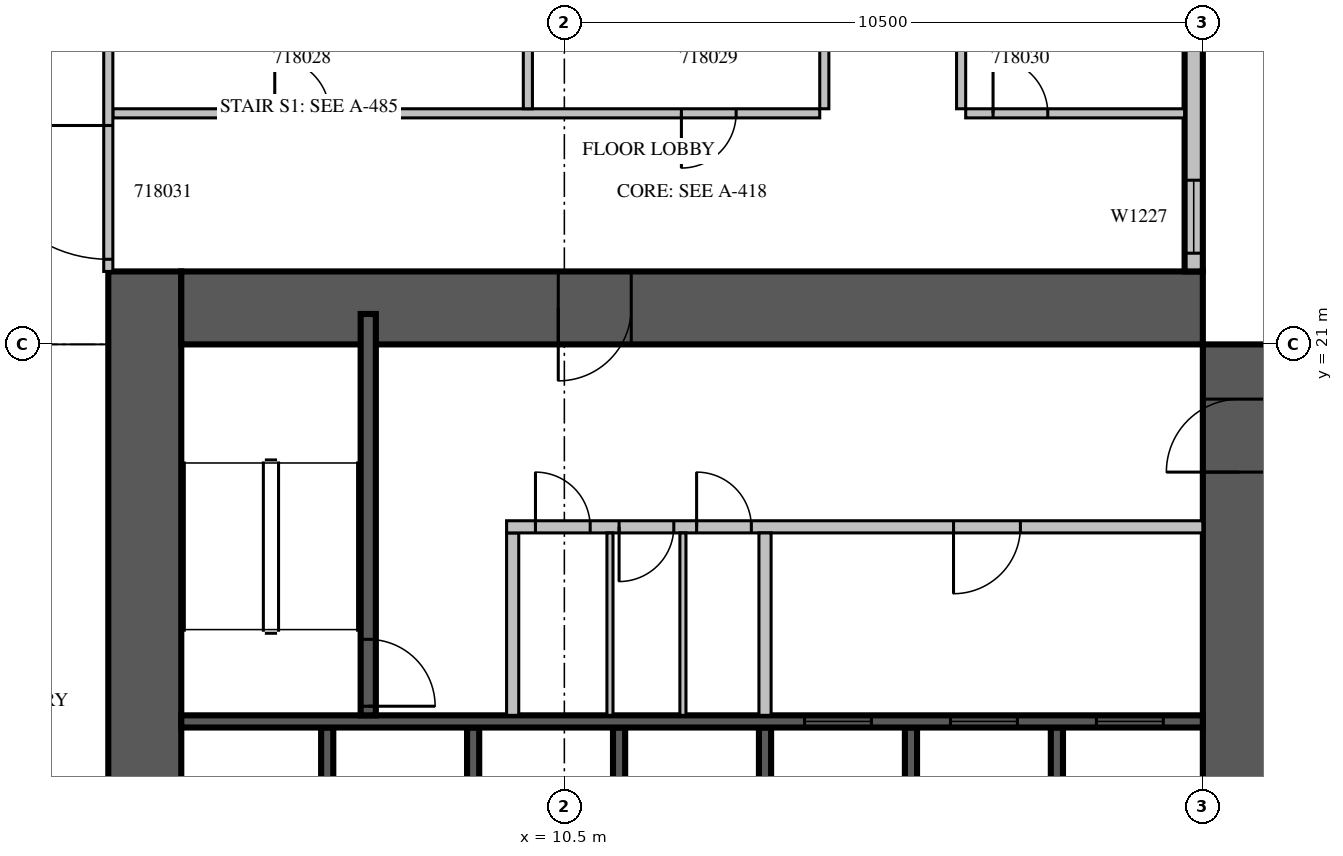
"""IFC4 building model, lengths in metres.
Left out: names, types, materials, properties, quantities, classifications, styles, units other than length and angle.
Written with IfcOpenShell. Run it as: python <this file> out.ifc"""

import sys

from ifc_helpers import new_model, si_unit, direction, frame, frame_2d, origin, place, context, subcontext, project, spatial, rectangle, extrude, source, transform, mapped, element, fill, save


model = new_model("IFC4")
c1 = context("Model", 3, precision=1e-05, world=origin(), true_north=direction((0.0, 1.0)))
c2 = subcontext(c1, "Body", "Model", "MODEL_VIEW")
j1 = project(units=[si_unit("LENGTHUNIT", "METRE"), si_unit("PLANEANGLEUNIT", "RADIAN")], contexts=[c1])
p1 = place(None, origin())
s1 = spatial("IfcSite", under=j1, at=p1, CompositionType="ELEMENT")
p2 = place(p1, origin())
s2 = spatial("IfcBuilding", under=s1, at=p2, CompositionType="ELEMENT")
p3 = place(p2, frame((0.0, 0.0, 86.7)))
s3 = spatial("IfcBuildingStorey", under=s2, at=p3, CompositionType="ELEMENT", Elevation=86.7)
m1 = source(origin(), c2, "Body", "SweptSolid", [
    extrude(rectangle(XDim=18.0, YDim=1.2, at=frame_2d((9.0, 0.0))), origin(), (0.0, 0.0, 1.0), 4.2),
])
p4 = place(p3, frame((3.6, 4.2, 0.0), z_axis=(0.0, 0.0, 1.0), x_axis=(0.0, 1.0, 0.0)))
e1 = element("IfcWall", 1, at=p4, inside=s3, PredefinedType="SHEAR", context=c2, shape_type="MappedRepresentation", body=[
    mapped(m1, transform((0.0, 0.0, 0.0), scale=1.0)),
])
m2 = source(origin(), c2, "Body", "SweptSolid", [
    extrude(rectangle(XDim=2.2, YDim=2.1, at=frame_2d((1.1, 1.05))), frame((0.0, 0.61, 0.0), z_axis=(0.0, -1.0, 0.0), x_axis=(1.0, 0.0, 0.0)), (0.0, 0.0, 1.0), 1.22),
])
p5 = place(p4, frame((4.2, 0.0, 0.0)))
e2 = element("IfcOpeningElement", 2, at=p5, cuts=e1, PredefinedType="OPENING", context=c2, shape_type="MappedRepresentation", body=[
    mapped(m2, transform((0.0, 0.0, 0.0), scale=1.0)),
])
m3 = source(origin(), c2, "Body", "SweptSolid", [
    extrude(rectangle(XDim=16.8, YDim=1.2, at=frame_2d((8.4, 0.0))), origin(), (0.0, 0.0, 1.0), 4.2),
])
p6 = place(p3, frame((21.6, 4.2, 0.0), z_axis=(0.0, 0.0, 1.0), x_axis=(0.0, 1.0, 0.0)))
e3 = element("IfcWall", 3, at=p6, inside=s3, PredefinedType="SHEAR", context=c2, shape_type="MappedRepresentation", body=[
    mapped(m3, transform((0.0, 0.0, 0.0), scale=1.0)),
])
p7 = place(p6, frame((4.2, 0.0, 0.0)))
e4 = element("IfcOpeningElement", 4, at=p7, cuts=e3, PredefinedType="OPENING", context=c2, shape_type="MappedRepresentation", body=[
    mapped(m2, transform((0.0, 0.0, 0.0), scale=1.0)),
])
m4 = source(origin(), c2, "Body", "SweptSolid", [
    extrude(rectangle(XDim=1.2, YDim=2.1, at=frame_2d((0.6, 1.05))), frame((0.0, 0.61, 0.0), z_axis=(0.0, -1.0, 0.0), x_axis=(1.0, 0.0, 0.0)), (0.0, 0.0, 1.0), 1.22),
])
p8 = place(p6, frame((14.7, 0.0, 0.0)))
e5 = element("IfcOpeningElement", 5, at=p8, cuts=e3, PredefinedType="OPENING", context=c2, shape_type="MappedRepresentation", body=[
    mapped(m4, transform((0.0, 0.0, 0.0), scale=1.0)),
])
p9 = place(p3, frame((4.2, 21.6, 0.0), z_axis=(0.0, 0.0, 1.0), x_axis=(1.0, 0.0, 0.0)))
e6 = element("IfcWall", 6, at=p9, inside=s3, PredefinedType="SHEAR", context=c2, shape_type="MappedRepresentation", body=[
    mapped(m3, transform((0.0, 0.0, 0.0), scale=1.0)),
])
p10 = place(p9, frame((6.2, 0.0, 0.0)))
e7 = element("IfcOpeningElement", 7, at=p10, cuts=e6, PredefinedType="OPENING", context=c2, shape_type="MappedRepresentation", body=[
    mapped(m4, transform((0.0, 0.0, 0.0), scale=1.0)),
])
m5 = source(origin(), c2, "Body", "SweptSolid", [
    extrude(rectangle(XDim=6.6, YDim=0.3, at=frame_2d((3.3, 0.0))), origin(), (0.0, 0.0, 1.0), 3.8),
])
p11 = place(p3, frame((20.85, 22.2, 0.0), z_axis=(0.0, 0.0, 1.0), x_axis=(0.0, 1.0, 0.0)))
e8 = element("IfcWall", 8, at=p11, inside=s3, PredefinedType="STANDARD", context=c2, shape_type="MappedRepresentation", body=[
    mapped(m5, transform((0.0, 0.0, 0.0), scale=1.0)),
])
m6 = source(origin(), c2, "Body", "SweptSolid", [
    extrude(rectangle(XDim=1.2, YDim=2.7, at=frame_2d((0.6, 1.35))), frame((0.0, 0.16, 0.0), z_axis=(0.0, -1.0, 0.0), x_axis=(1.0, 0.0, 0.0)), (0.0, 0.0, 1.0), 0.32),
])
p12 = place(p11, frame((0.3, 0.0, 0.6)))
e9 = element("IfcOpeningElement", 9, at=p12, cuts=e8, PredefinedType="OPENING", context=c2, shape_type="MappedRepresentation", body=[
    mapped(m6, transform((0.0, 0.0, 0.0), scale=1.0)),
])
m7 = source(origin(), c2, "Body", "SweptSolid", [
    extrude(rectangle(XDim=2.4, YDim=2.7, at=frame_2d((1.2, 1.35))), frame((0.0, 0.16, 0.0), z_axis=(0.0, -1.0, 0.0), x_axis=(1.0, 0.0, 0.0)), (0.0, 0.0, 1.0), 0.32),
])
p13 = place(p11, frame((3.9, 0.0, 0.6)))
e10 = element("IfcOpeningElement", 10, at=p13, cuts=e8, PredefinedType="OPENING", context=c2, shape_type="MappedRepresentation", body=[
    mapped(m7, transform((0.0, 0.0, 0.0), scale=1.0)),
])
m8 = source(origin(), c2, "Body", "SweptSolid", [
    extrude(rectangle(XDim=3.0, YDim=0.2, at=frame_2d((1.5, 0.0))), origin(), (0.0, 0.0, 1.0), 4.2),
])
for number, where, z_axis, x_axis in (
    (11, (6.6, 11.7, 0.0), (0.0, 0.0, 1.0), (0.0, 1.0, 0.0)),
    (12, (9.0, 11.7, 0.0), (0.0, 0.0, 1.0), (0.0, 1.0, 0.0)),
    (13, (11.4, 11.7, 0.0), (0.0, 0.0, 1.0), (0.0, 1.0, 0.0)),
    (14, (13.8, 11.7, 0.0), (0.0, 0.0, 1.0), (0.0, 1.0, 0.0)),
    (15, (16.2, 11.7, 0.0), (0.0, 0.0, 1.0), (0.0, 1.0, 0.0)),
    (16, (18.6, 11.7, 0.0), (0.0, 0.0, 1.0), (0.0, 1.0, 0.0)),
):
    element("IfcWall", number, at=place(p3, frame(where, z_axis=z_axis, x_axis=x_axis)), inside=s3, PredefinedType="SOLIDWALL", context=c2, shape_type="MappedRepresentation", body=[
        mapped(m8, transform((0.0, 0.0, 0.0), scale=1.0)),
    ])
m9 = source(origin(), c2, "Body", "SweptSolid", [
    extrude(rectangle(XDim=16.8, YDim=0.2, at=frame_2d((8.4, 0.0))), origin(), (0.0, 0.0, 1.0), 4.2),
])
p14 = place(p3, frame((4.2, 14.8, 0.0), z_axis=(0.0, 0.0, 1.0), x_axis=(1.0, 0.0, 0.0)))
e17 = element("IfcWall", 17, at=p14, inside=s3, PredefinedType="SOLIDWALL", context=c2, shape_type="MappedRepresentation", body=[
    mapped(m9, transform((0.0, 0.0, 0.0), scale=1.0)),
])
m10 = source(origin(), c2, "Body", "SweptSolid", [
    extrude(rectangle(XDim=1.1, YDim=2.1, at=frame_2d((0.55, 1.05))), frame((0.0, 0.11, 0.0), z_axis=(0.0, -1.0, 0.0), x_axis=(1.0, 0.0, 0.0)), (0.0, 0.0, 1.0), 0.22),
])
p15 = place(p14, frame((10.25, 0.0, 0.0)))
e18 = element("IfcOpeningElement", 18, at=p15, cuts=e17, PredefinedType="OPENING", context=c2, shape_type="MappedRepresentation", body=[
    mapped(m10, transform((0.0, 0.0, 0.0), scale=1.0)),
])
p16 = place(p14, frame((12.65, 0.0, 0.0)))
e19 = element("IfcOpeningElement", 19, at=p16, cuts=e17, PredefinedType="OPENING", context=c2, shape_type="MappedRepresentation", body=[
    mapped(m10, transform((0.0, 0.0, 0.0), scale=1.0)),
])
p17 = place(p14, frame((15.05, 0.0, 0.0)))
e20 = element("IfcOpeningElement", 20, at=p17, cuts=e17, PredefinedType="OPENING", context=c2, shape_type="MappedRepresentation", body=[
    mapped(m10, transform((0.0, 0.0, 0.0), scale=1.0)),
])
m11 = source(origin(), c2, "Body", "SweptSolid", [
    extrude(rectangle(XDim=6.6, YDim=0.25, at=frame_2d((3.3, 0.0))), origin(), (0.0, 0.0, 1.0), 3.8),
])
p18 = place(p3, frame((7.275, 14.9, 0.0), z_axis=(0.0, 0.0, 1.0), x_axis=(0.0, 1.0, 0.0)))
e21 = element("IfcWall", 21, at=p18, inside=s3, PredefinedType="SOLIDWALL", context=c2, shape_type="MappedRepresentation", body=[
    mapped(m11, transform((0.0, 0.0, 0.0), scale=1.0)),
])
m12 = source(origin(), c2, "Body", "SweptSolid", [
    extrude(rectangle(XDim=1.1, YDim=2.1, at=frame_2d((0.55, 1.05))), frame((0.0, 0.135, 0.0), z_axis=(0.0, -1.0, 0.0), x_axis=(1.0, 0.0, 0.0)), (0.0, 0.0, 1.0), 0.27),
])
p19 = place(p18, frame((0.15, 0.0, 0.0)))
e22 = element("IfcOpeningElement", 22, at=p19, cuts=e21, PredefinedType="OPENING", context=c2, shape_type="MappedRepresentation", body=[
    mapped(m12, transform((0.0, 0.0, 0.0), scale=1.0)),
])
m13 = source(origin(), c2, "Body", "SweptSolid", [
    extrude(rectangle(XDim=3.0, YDim=0.2, at=frame_2d((1.5, 0.0))), origin(), (0.0, 0.0, 1.0), 3.8),
])
p20 = place(p3, frame((9.65, 14.9, 0.0), z_axis=(0.0, 0.0, 1.0), x_axis=(0.0, 1.0, 0.0)))
e23 = element("IfcWall", 23, at=p20, inside=s3, PredefinedType="PARTITIONING", context=c2, shape_type="MappedRepresentation", body=[
    mapped(m13, transform((0.0, 0.0, 0.0), scale=1.0)),
])
m14 = source(origin(), c2, "Body", "SweptSolid", [
    extrude(rectangle(XDim=11.45, YDim=0.2, at=frame_2d((5.725, 0.0))), origin(), (0.0, 0.0, 1.0), 3.8),
])
p21 = place(p3, frame((9.55, 18.0, 0.0), z_axis=(0.0, 0.0, 1.0), x_axis=(1.0, 0.0, 0.0)))
e24 = element("IfcWall", 24, at=p21, inside=s3, PredefinedType="PARTITIONING", context=c2, shape_type="MappedRepresentation", body=[
    mapped(m14, transform((0.0, 0.0, 0.0), scale=1.0)),
])
m15 = source(origin(), c2, "Body", "SweptSolid", [
    extrude(rectangle(XDim=0.9, YDim=2.1, at=frame_2d((0.45, 1.05))), frame((0.0, 0.11, 0.0), z_axis=(0.0, -1.0, 0.0), x_axis=(1.0, 0.0, 0.0)), (0.0, 0.0, 1.0), 0.22),
])
p22 = place(p21, frame((0.475, 0.0, 0.0)))
e25 = element("IfcOpeningElement", 25, at=p22, cuts=e24, PredefinedType="OPENING", context=c2, shape_type="MappedRepresentation", body=[
    mapped(m15, transform((0.0, 0.0, 0.0), scale=1.0)),
])
p23 = place(p21, frame((1.85, 0.0, 0.0)))
e26 = element("IfcOpeningElement", 26, at=p23, cuts=e24, PredefinedType="OPENING", context=c2, shape_type="MappedRepresentation", body=[
    mapped(m15, transform((0.0, 0.0, 0.0), scale=1.0)),
])
p24 = place(p21, frame((3.125, 0.0, 0.0)))
e27 = element("IfcOpeningElement", 27, at=p24, cuts=e24, PredefinedType="OPENING", context=c2, shape_type="MappedRepresentation", body=[
    mapped(m15, transform((0.0, 0.0, 0.0), scale=1.0)),
])
p25 = place(p21, frame((7.35, 0.0, 0.0)))
e28 = element("IfcOpeningElement", 28, at=p25, cuts=e24, PredefinedType="OPENING", context=c2, shape_type="MappedRepresentation", body=[
    mapped(m10, transform((0.0, 0.0, 0.0), scale=1.0)),
])
p26 = place(p3, frame((13.8, 14.9, 0.0), z_axis=(0.0, 0.0, 1.0), x_axis=(0.0, 1.0, 0.0)))
e29 = element("IfcWall", 29, at=p26, inside=s3, PredefinedType="PARTITIONING", context=c2, shape_type="MappedRepresentation", body=[
    mapped(m13, transform((0.0, 0.0, 0.0), scale=1.0)),
])
m16 = source(origin(), c2, "Body", "SweptSolid", [
    extrude(rectangle(XDim=3.0, YDim=0.1, at=frame_2d((1.5, 0.0))), origin(), (0.0, 0.0, 1.0), 3.8),
])
for number, where, z_axis, x_axis in (
    (30, (11.25, 14.9, 0.0), (0.0, 0.0, 1.0), (0.0, 1.0, 0.0)),
    (31, (12.45, 14.9, 0.0), (0.0, 0.0, 1.0), (0.0, 1.0, 0.0)),
):
    element("IfcWall", number, at=place(p3, frame(where, z_axis=z_axis, x_axis=x_axis)), inside=s3, PredefinedType="PARTITIONING", context=c2, shape_type="MappedRepresentation", body=[
        mapped(m16, transform((0.0, 0.0, 0.0), scale=1.0)),
    ])
m17 = source(origin(), c2, "Body", "SweptSolid", [
    extrude(rectangle(XDim=11.625, YDim=0.15, at=frame_2d((5.812, 0.0))), origin(), (0.0, 0.0, 1.0), 3.8),
])
p27 = place(p3, frame((3.075, 24.8, 0.0), z_axis=(0.0, 0.0, 1.0), x_axis=(1.0, 0.0, 0.0)))
e32 = element("IfcWall", 32, at=p27, inside=s3, PredefinedType="PARTITIONING", context=c2, shape_type="MappedRepresentation", body=[
    mapped(m17, transform((0.0, 0.0, 0.0), scale=1.0)),
])
m18 = source(origin(), c2, "Body", "SweptSolid", [
    extrude(rectangle(XDim=0.9, YDim=2.1, at=frame_2d((0.45, 1.05))), frame((0.0, 0.085, 0.0), z_axis=(0.0, -1.0, 0.0), x_axis=(1.0, 0.0, 0.0)), (0.0, 0.0, 1.0), 0.17),
])
p28 = place(p27, frame((2.663, 0.0, 0.0)))
e33 = element("IfcOpeningElement", 33, at=p28, cuts=e32, PredefinedType="OPENING", context=c2, shape_type="MappedRepresentation", body=[
    mapped(m18, transform((0.0, 0.0, 0.0), scale=1.0)),
])
p29 = place(p27, frame((9.35, 0.0, 0.0)))
e34 = element("IfcOpeningElement", 34, at=p29, cuts=e32, PredefinedType="OPENING", context=c2, shape_type="MappedRepresentation", body=[
    mapped(m18, transform((0.0, 0.0, 0.0), scale=1.0)),
])
m19 = source(origin(), c2, "Body", "SweptSolid", [
    extrude(rectangle(XDim=3.6, YDim=0.15, at=frame_2d((1.8, 0.0))), origin(), (0.0, 0.0, 1.0), 3.8),
])
p30 = place(p3, frame((17.1, 24.8, 0.0), z_axis=(0.0, 0.0, 1.0), x_axis=(1.0, 0.0, 0.0)))
e35 = element("IfcWall", 35, at=p30, inside=s3, PredefinedType="PARTITIONING", context=c2, shape_type="MappedRepresentation", body=[
    mapped(m19, transform((0.0, 0.0, 0.0), scale=1.0)),
])
p31 = place(p30, frame((0.45, 0.0, 0.0)))
e36 = element("IfcOpeningElement", 36, at=p31, cuts=e35, PredefinedType="OPENING", context=c2, shape_type="MappedRepresentation", body=[
    mapped(m18, transform((0.0, 0.0, 0.0), scale=1.0)),
])
m20 = source(origin(), c2, "Body", "SweptSolid", [
    extrude(rectangle(XDim=4.45, YDim=0.15, at=frame_2d((2.225, 0.0))), origin(), (0.0, 0.0, 1.0), 3.8),
])
for number, where, z_axis, x_axis in (
    (37, (9.9, 24.875, 0.0), (0.0, 0.0, 1.0), (0.0, 1.0, 0.0)),
    (38, (14.775, 24.875, 0.0), (0.0, 0.0, 1.0), (0.0, 1.0, 0.0)),
    (39, (17.025, 29.325, 0.0), (0.0, 0.0, 1.0), (0.0, -1.0, 0.0)),
):
    element("IfcWall", number, at=place(p3, frame(where, z_axis=z_axis, x_axis=x_axis)), inside=s3, PredefinedType="PARTITIONING", context=c2, shape_type="MappedRepresentation", body=[
        mapped(m20, transform((0.0, 0.0, 0.0), scale=1.0)),
    ])
m21 = source(origin(), c2, "Body", "SweptSolid", [
    extrude(rectangle(XDim=7.125, YDim=0.15, at=frame_2d((3.562, 0.0))), origin(), (0.0, 0.0, 1.0), 3.8),
])
p32 = place(p3, frame((3.0, 29.325, 0.0), z_axis=(0.0, 0.0, 1.0), x_axis=(0.0, -1.0, 0.0)))
e40 = element("IfcWall", 40, at=p32, inside=s3, PredefinedType="PARTITIONING", context=c2, shape_type="MappedRepresentation", body=[
    mapped(m21, transform((0.0, 0.0, 0.0), scale=1.0)),
])
m22 = source(origin(), c2, "Body", "SweptSolid", [
    extrude(rectangle(XDim=2.2, YDim=2.1, at=frame_2d((1.1, 1.05))), frame((0.0, 0.085, 0.0), z_axis=(0.0, -1.0, 0.0), x_axis=(1.0, 0.0, 0.0)), (0.0, 0.0, 1.0), 0.17),
])
p33 = place(p32, frame((4.725, 0.0, 0.0)))
e41 = element("IfcOpeningElement", 41, at=p33, cuts=e40, PredefinedType="OPENING", context=c2, shape_type="MappedRepresentation", body=[
    mapped(m22, transform((0.0, 0.0, 0.0), scale=1.0)),
])
m23 = source(origin(), c2, "Body", "SweptSolid", [
    extrude(rectangle(XDim=1.2, YDim=2.7, at=frame_2d((0.6, 1.35))), frame((0.0, 0.03, 0.0), z_axis=(0.0, -1.0, 0.0), x_axis=(1.0, 0.0, 0.0)), (0.0, 0.0, 1.0), 0.06),
])
p34 = place(p12, origin())
e42 = element("IfcWindow", 42, at=p34, inside=s3, PartitioningType="SINGLE_PANEL", PredefinedType="WINDOW", context=c2, shape_type="MappedRepresentation", body=[
    mapped(m23, transform((0.0, 0.0, 0.0), scale=1.0)),
])
fill(e9, e42)
m24 = source(origin(), c2, "Body", "SweptSolid", [
    extrude(rectangle(XDim=1.1, YDim=2.1, at=frame_2d((0.55, 1.05))), frame((0.0, 0.025, 0.0), z_axis=(0.0, -1.0, 0.0), x_axis=(1.0, 0.0, 0.0)), (0.0, 0.0, 1.0), 0.05),
])
p35 = place(p15, origin())
e43 = element("IfcDoor", 43, at=p35, inside=s3, OperationType="SLIDING_TO_LEFT", PredefinedType="DOOR", context=c2, shape_type="MappedRepresentation", body=[
    mapped(m24, transform((0.0, 0.0, 0.0), scale=1.0)),
])
fill(e18, e43)
p36 = place(p16, origin())
e44 = element("IfcDoor", 44, at=p36, inside=s3, OperationType="SLIDING_TO_LEFT", PredefinedType="DOOR", context=c2, shape_type="MappedRepresentation", body=[
    mapped(m24, transform((0.0, 0.0, 0.0), scale=1.0)),
])
fill(e19, e44)
p37 = place(p17, origin())
e45 = element("IfcDoor", 45, at=p37, inside=s3, OperationType="SLIDING_TO_LEFT", PredefinedType="DOOR", context=c2, shape_type="MappedRepresentation", body=[
    mapped(m24, transform((0.0, 0.0, 0.0), scale=1.0)),
])
fill(e20, e45)
p38 = place(p19, origin())
e46 = element("IfcDoor", 46, at=p38, inside=s3, OperationType="SINGLE_SWING_RIGHT", PredefinedType="DOOR", context=c2, shape_type="MappedRepresentation", body=[
    mapped(m24, transform((0.0, 0.0, 0.0), scale=1.0)),
])
fill(e22, e46)
m25 = source(origin(), c2, "Body", "SweptSolid", [
    extrude(rectangle(XDim=0.9, YDim=2.1, at=frame_2d((0.45, 1.05))), frame((0.0, 0.025, 0.0), z_axis=(0.0, -1.0, 0.0), x_axis=(1.0, 0.0, 0.0)), (0.0, 0.0, 1.0), 0.05),
])
p39 = place(p22, origin())
e47 = element("IfcDoor", 47, at=p39, inside=s3, OperationType="SINGLE_SWING_LEFT", PredefinedType="DOOR", context=c2, shape_type="MappedRepresentation", body=[
    mapped(m25, transform((0.0, 0.0, 0.0), scale=1.0)),
])
fill(e25, e47)
p40 = place(p23, origin())
e48 = element("IfcDoor", 48, at=p40, inside=s3, OperationType="SINGLE_SWING_RIGHT", PredefinedType="DOOR", context=c2, shape_type="MappedRepresentation", body=[
    mapped(m25, transform((0.0, 0.0, 0.0), scale=1.0)),
])
fill(e26, e48)
p41 = place(p24, origin())
e49 = element("IfcDoor", 49, at=p41, inside=s3, OperationType="SINGLE_SWING_LEFT", PredefinedType="DOOR", context=c2, shape_type="MappedRepresentation", body=[
    mapped(m25, transform((0.0, 0.0, 0.0), scale=1.0)),
])
fill(e27, e49)
p42 = place(p25, origin())
e50 = element("IfcDoor", 50, at=p42, inside=s3, OperationType="SINGLE_SWING_RIGHT", PredefinedType="DOOR", context=c2, shape_type="MappedRepresentation", body=[
    mapped(m24, transform((0.0, 0.0, 0.0), scale=1.0)),
])
fill(e28, e50)
m26 = source(origin(), c2, "Body", "SweptSolid", [
    extrude(rectangle(XDim=1.2, YDim=2.1, at=frame_2d((0.6, 1.05))), frame((0.0, 0.025, 0.0), z_axis=(0.0, -1.0, 0.0), x_axis=(1.0, 0.0, 0.0)), (0.0, 0.0, 1.0), 0.05),
])
p43 = place(p10, origin())
e51 = element("IfcDoor", 51, at=p43, inside=s3, OperationType="SINGLE_SWING_RIGHT", PredefinedType="DOOR", context=c2, shape_type="MappedRepresentation", body=[
    mapped(m26, transform((0.0, 0.0, 0.0), scale=1.0)),
])
fill(e7, e51)
p44 = place(p8, origin())
e52 = element("IfcDoor", 52, at=p44, inside=s3, OperationType="SINGLE_SWING_LEFT", PredefinedType="DOOR", context=c2, shape_type="MappedRepresentation", body=[
    mapped(m26, transform((0.0, 0.0, 0.0), scale=1.0)),
])
fill(e5, e52)
p45 = place(p28, origin())
e53 = element("IfcDoor", 53, at=p45, inside=s3, OperationType="SINGLE_SWING_LEFT", PredefinedType="DOOR", context=c2, shape_type="MappedRepresentation", body=[
    mapped(m25, transform((0.0, 0.0, 0.0), scale=1.0)),
])
fill(e33, e53)
p46 = place(p29, origin())
e54 = element("IfcDoor", 54, at=p46, inside=s3, OperationType="SINGLE_SWING_RIGHT", PredefinedType="DOOR", context=c2, shape_type="MappedRepresentation", body=[
    mapped(m25, transform((0.0, 0.0, 0.0), scale=1.0)),
])
fill(e34, e54)
p47 = place(p31, origin())
e55 = element("IfcDoor", 55, at=p47, inside=s3, OperationType="SINGLE_SWING_LEFT", PredefinedType="DOOR", context=c2, shape_type="MappedRepresentation", body=[
    mapped(m25, transform((0.0, 0.0, 0.0), scale=1.0)),
])
fill(e36, e55)
m27 = source(origin(), c2, "Body", "SweptSolid", [
    extrude(rectangle(XDim=2.2, YDim=2.1, at=frame_2d((1.1, 1.05))), frame((0.0, 0.025, 0.0), z_axis=(0.0, -1.0, 0.0), x_axis=(1.0, 0.0, 0.0)), (0.0, 0.0, 1.0), 0.05),
])
p48 = place(p33, origin())
e56 = element("IfcDoor", 56, at=p48, inside=s3, OperationType="DOUBLE_DOOR_SINGLE_SWING", PredefinedType="DOOR", context=c2, shape_type="MappedRepresentation", body=[
    mapped(m27, transform((0.0, 0.0, 0.0), scale=1.0)),
])
fill(e41, e56)
save(model, sys.argv[1])
